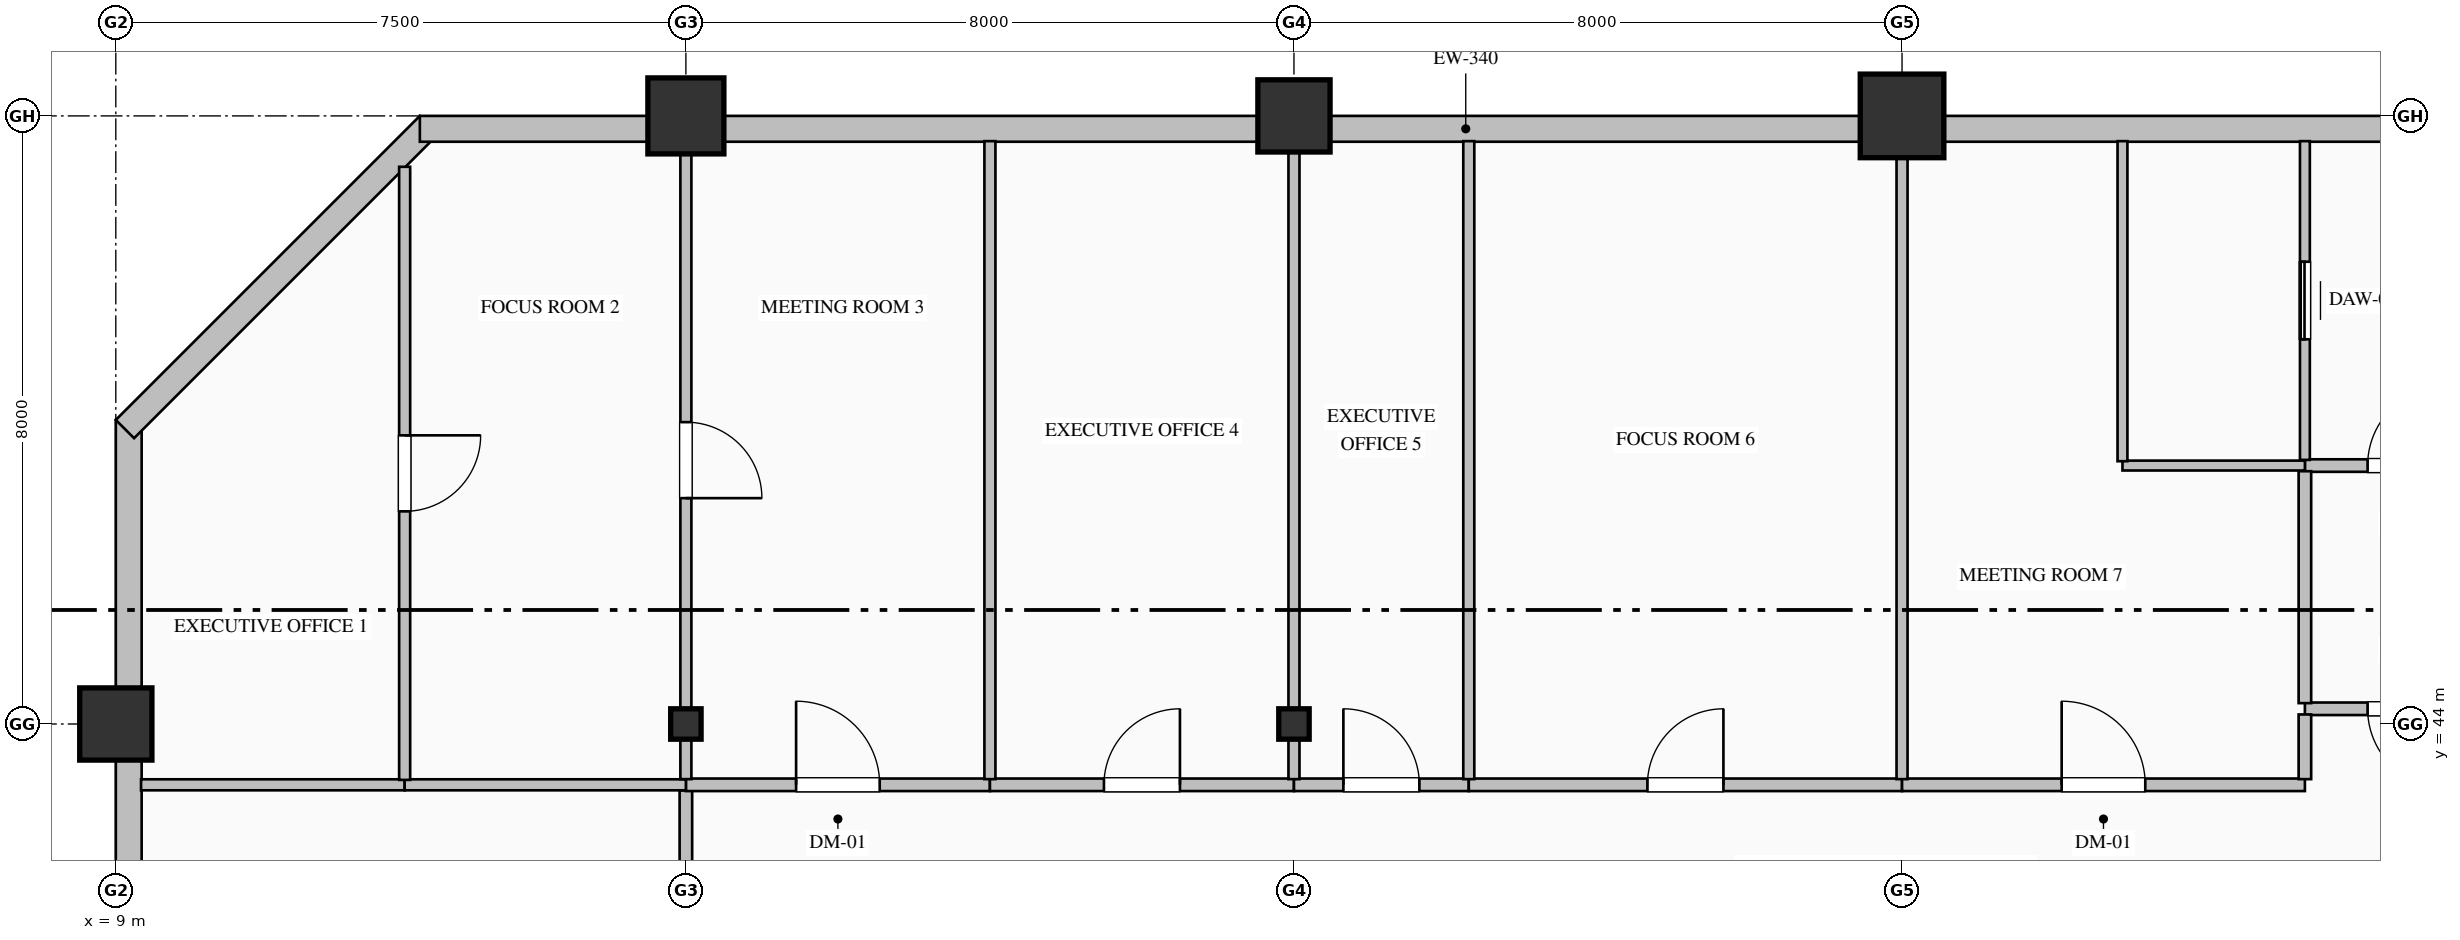
"""IFC4 building model, lengths in metres.
Left out: names, types, materials, properties, quantities, classifications, styles, units other than length and angle.
Written with IfcOpenShell. Run it as: python <this file> out.ifc"""

import sys

from ifc_helpers import new_model, si_unit, direction, frame, frame_2d, origin, origin_2d, place, context, subcontext, project, spatial, rectangle, hollow_rectangle, hollow_circle, i_section, extrude, element, fill, save


model = new_model("IFC4")
c1 = context("Model", 3, precision=1e-05, world=origin(), true_north=direction((0.0, 1.0)))
c2 = subcontext(c1, "Body", "Model", "MODEL_VIEW")
j1 = project(units=[si_unit("LENGTHUNIT", "METRE"), si_unit("PLANEANGLEUNIT", "RADIAN")], contexts=[c1])
p1 = place(None, origin())
s1 = spatial("IfcSite", under=j1, at=p1, CompositionType="ELEMENT")
p2 = place(p1, origin())
s2 = spatial("IfcBuilding", under=s1, at=p2, CompositionType="ELEMENT")
p3 = place(p2, frame((0.0, 0.0, 127.0)))
s3 = spatial("IfcBuildingStorey", under=s2, at=p3, CompositionType="ELEMENT", Elevation=127.0)
p4 = place(p3, frame((9.0, 44.0, 0.0), z_axis=(0.0, 0.0, 1.0), x_axis=(1.0, 0.0, 0.0)))
e1 = element("IfcColumn", 1, at=p4, inside=s3, PredefinedType="COLUMN", context=c2, shape_type="SweptSolid", body=[
    extrude(hollow_rectangle(XDim=0.95, YDim=0.95, WallThickness=0.036, at=origin_2d()), origin(), (0.0, 0.0, 1.0), 4.0),
])
p5 = place(p3, frame((16.5, 44.0, 0.0), z_axis=(0.0, 0.0, 1.0), x_axis=(1.0, 0.0, 0.0)))
e2 = element("IfcColumn", 2, at=p5, inside=s3, PredefinedType="COLUMN", context=c2, shape_type="SweptSolid", body=[
    extrude(i_section(OverallWidth=0.4, OverallDepth=0.4, WebThickness=0.013, FlangeThickness=0.021, FilletRadius=0.022, at=origin_2d()), origin(), (0.0, 0.0, 1.0), 4.0),
])
p6 = place(p3, frame((16.5, 52.0, 0.0), z_axis=(0.0, 0.0, 1.0), x_axis=(1.0, 0.0, 0.0)))
e3 = element("IfcColumn", 3, at=p6, inside=s3, PredefinedType="COLUMN", context=c2, shape_type="SweptSolid", body=[
    extrude(hollow_circle(Radius=0.5, WallThickness=0.036, at=origin_2d()), origin(), (0.0, 0.0, 1.0), 4.0),
])
p7 = place(p3, frame((24.5, 44.0, 0.0), z_axis=(0.0, 0.0, 1.0), x_axis=(1.0, 0.0, 0.0)))
e4 = element("IfcColumn", 4, at=p7, inside=s3, PredefinedType="COLUMN", context=c2, shape_type="SweptSolid", body=[
    extrude(i_section(OverallWidth=0.4, OverallDepth=0.4, WebThickness=0.013, FlangeThickness=0.021, FilletRadius=0.022, at=origin_2d()), origin(), (0.0, 0.0, 1.0), 4.0),
])
p8 = place(p3, frame((24.5, 52.0, 0.0), z_axis=(0.0, 0.0, 1.0), x_axis=(1.0, 0.0, 0.0)))
e5 = element("IfcColumn", 5, at=p8, inside=s3, PredefinedType="COLUMN", context=c2, shape_type="SweptSolid", body=[
    extrude(hollow_rectangle(XDim=0.95, YDim=0.95, WallThickness=0.036, at=origin_2d()), origin(), (0.0, 0.0, 1.0), 4.0),
])
p9 = place(p3, frame((32.5, 52.0, 0.0), z_axis=(0.0, 0.0, 1.0), x_axis=(1.0, 0.0, 0.0)))
e6 = element("IfcColumn", 6, at=p9, inside=s3, PredefinedType="COLUMN", context=c2, shape_type="SweptSolid", body=[
    extrude(hollow_rectangle(XDim=1.1, YDim=1.1, WallThickness=0.04, at=origin_2d()), origin(), (0.0, 0.0, 1.0), 4.0),
])
p10 = place(p3, frame((9.17, 32.0, 0.0), z_axis=(0.0, 0.0, 1.0), x_axis=(0.0, 1.0, 0.0)))
e7 = element("IfcWall", 7, at=p10, inside=s3, PredefinedType="SOLIDWALL", context=c2, shape_type="SweptSolid", body=[
    extrude(rectangle(XDim=16.0, YDim=0.34, at=frame_2d((8.0, 0.0))), origin(), (0.0, 0.0, 1.0), 3.265),
])
p11 = place(p10, frame((6.375, 0.0, 0.85)))
e8 = element("IfcOpeningElement", 8, at=p11, cuts=e7, PredefinedType="OPENING", context=c2, shape_type="SweptSolid", body=[
    extrude(rectangle(XDim=1.65, YDim=1.95, at=frame_2d((0.825, 0.975))), frame((0.0, 0.18, 0.0), z_axis=(0.0, -1.0, 0.0), x_axis=(1.0, 0.0, 0.0)), (0.0, 0.0, 1.0), 0.36),
])
p12 = place(p3, frame((9.12, 47.88, 0.0), z_axis=(0.0, 0.0, 1.0), x_axis=(0.707106781187, 0.707106781187, 0.0)))
e9 = element("IfcWall", 9, at=p12, inside=s3, PredefinedType="SOLIDWALL", context=c2, shape_type="SweptSolid", body=[
    extrude(rectangle(XDim=5.657, YDim=0.34, at=frame_2d((2.828, 0.0))), origin(), (0.0, 0.0, 1.0), 3.765),
])
p13 = place(p3, frame((13.0, 51.83, 0.0), z_axis=(0.0, 0.0, 1.0), x_axis=(1.0, 0.0, 0.0)))
e10 = element("IfcWall", 10, at=p13, inside=s3, PredefinedType="SOLIDWALL", context=c2, shape_type="SweptSolid", body=[
    extrude(rectangle(XDim=27.52, YDim=0.34, at=frame_2d((13.76, 0.0))), origin(), (0.0, 0.0, 1.0), 3.265),
])
p14 = place(p3, frame((37.8, 47.4, 0.0), z_axis=(0.0, 0.0, 1.0), x_axis=(1.0, 0.0, 0.0)))
e11 = element("IfcWall", 11, at=p14, inside=s3, PredefinedType="PARTITIONING", context=c2, shape_type="SweptSolid", body=[
    extrude(rectangle(XDim=2.7, YDim=0.165, at=frame_2d((1.35, 0.0))), origin(), (0.0, 0.0, 1.0), 3.765),
])
p15 = place(p14, frame((0.825, 0.0, 0.0)))
e12 = element("IfcOpeningElement", 12, at=p15, cuts=e11, PredefinedType="OPENING", context=c2, shape_type="SweptSolid", body=[
    extrude(rectangle(XDim=1.05, YDim=2.15, at=frame_2d((0.525, 1.075))), frame((0.0, 0.093, 0.0), z_axis=(0.0, -1.0, 0.0), x_axis=(1.0, 0.0, 0.0)), (0.0, 0.0, 1.0), 0.185),
])
p16 = place(p3, frame((40.5, 44.2, 0.0), z_axis=(0.0, 0.0, 1.0), x_axis=(-1.0, 0.0, 0.0)))
e13 = element("IfcWall", 13, at=p16, inside=s3, PredefinedType="PARTITIONING", context=c2, shape_type="SweptSolid", body=[
    extrude(rectangle(XDim=2.7, YDim=0.165, at=frame_2d((1.35, 0.0))), origin(), (0.0, 0.0, 1.0), 3.765),
])
p17 = place(p16, frame((0.825, 0.0, 0.0)))
e14 = element("IfcOpeningElement", 14, at=p17, cuts=e13, PredefinedType="OPENING", context=c2, shape_type="SweptSolid", body=[
    extrude(rectangle(XDim=1.05, YDim=2.15, at=frame_2d((0.525, 1.075))), frame((0.0, 0.093, 0.0), z_axis=(0.0, -1.0, 0.0), x_axis=(1.0, 0.0, 0.0)), (0.0, 0.0, 1.0), 0.185),
])
p18 = place(p3, frame((37.8, 44.274, 0.0), z_axis=(0.0, 0.0, 1.0), x_axis=(0.0, 1.0, 0.0)))
e15 = element("IfcWall", 15, at=p18, inside=s3, PredefinedType="PARTITIONING", context=c2, shape_type="SweptSolid", body=[
    extrude(rectangle(XDim=3.051, YDim=0.165, at=frame_2d((1.525, 0.0))), origin(), (0.0, 0.0, 1.0), 3.765),
])
p19 = place(p3, frame((37.8, 47.475, 0.0), z_axis=(0.0, 0.0, 1.0), x_axis=(0.0, 1.0, 0.0)))
e16 = element("IfcWall", 16, at=p19, inside=s3, PredefinedType="PARTITIONING", context=c2, shape_type="SweptSolid", body=[
    extrude(rectangle(XDim=4.193, YDim=0.13, at=frame_2d((2.097, 0.0))), origin(), (0.0, 0.0, 1.0), 3.765),
])
p20 = place(p19, frame((1.587, 0.0, 0.0)))
e17 = element("IfcOpeningElement", 17, at=p20, cuts=e16, PredefinedType="OPENING", context=c2, shape_type="SweptSolid", body=[
    extrude(rectangle(XDim=1.02, YDim=2.15, at=frame_2d((0.51, 1.075))), frame((0.0, 0.075, 0.0), z_axis=(0.0, -1.0, 0.0), x_axis=(1.0, 0.0, 0.0)), (0.0, 0.0, 1.0), 0.15),
])
p21 = place(p3, frame((37.8, 47.4, 0.0), z_axis=(0.0, 0.0, 1.0), x_axis=(-1.0, 0.0, 0.0)))
e18 = element("IfcWall", 18, at=p21, inside=s3, PredefinedType="PARTITIONING", context=c2, shape_type="SweptSolid", body=[
    extrude(rectangle(XDim=2.4, YDim=0.13, at=frame_2d((1.2, 0.0))), origin(), (0.0, 0.0, 1.0), 3.765),
])
p22 = place(p3, frame((35.4, 47.457, 0.0), z_axis=(0.0, 0.0, 1.0), x_axis=(0.0, 1.0, 0.0)))
e19 = element("IfcWall", 19, at=p22, inside=s3, PredefinedType="PARTITIONING", context=c2, shape_type="SweptSolid", body=[
    extrude(rectangle(XDim=4.211, YDim=0.13, at=frame_2d((2.105, 0.0))), origin(), (0.0, 0.0, 1.0), 3.765),
])
p23 = place(p3, frame((16.5, 41.0, 0.0), z_axis=(0.0, 0.0, 1.0), x_axis=(0.0, 1.0, 0.0)))
e20 = element("IfcWall", 20, at=p23, inside=s3, PredefinedType="PARTITIONING", context=c2, shape_type="SweptSolid", body=[
    extrude(rectangle(XDim=2.125, YDim=0.165, at=frame_2d((1.063, 0.0))), origin(), (0.0, 0.0, 1.0), 3.157),
])
p24 = place(p3, frame((16.5, 43.2, 0.0), z_axis=(0.0, 0.0, 1.0), x_axis=(1.0, 0.0, 0.0)))
e21 = element("IfcWall", 21, at=p24, inside=s3, PredefinedType="PARTITIONING", context=c2, shape_type="SweptSolid", body=[
    extrude(rectangle(XDim=4.0, YDim=0.165, at=frame_2d((2.0, 0.0))), origin(), (0.0, 0.0, 1.0), 3.765),
])
p25 = place(p24, frame((1.45, 0.0, 0.0)))
e22 = element("IfcOpeningElement", 22, at=p25, cuts=e21, PredefinedType="OPENING", context=c2, shape_type="SweptSolid", body=[
    extrude(rectangle(XDim=1.1, YDim=2.2, at=frame_2d((0.55, 1.1))), frame((0.0, 0.093, 0.0), z_axis=(0.0, -1.0, 0.0), x_axis=(1.0, 0.0, 0.0)), (0.0, 0.0, 1.0), 0.185),
])
p26 = place(p3, frame((20.5, 43.2, 0.0), z_axis=(0.0, 0.0, 1.0), x_axis=(1.0, 0.0, 0.0)))
e23 = element("IfcWall", 23, at=p26, inside=s3, PredefinedType="PARTITIONING", context=c2, shape_type="SweptSolid", body=[
    extrude(rectangle(XDim=4.0, YDim=0.165, at=frame_2d((2.0, 0.0))), origin(), (0.0, 0.0, 1.0), 3.765),
])
p27 = place(p26, frame((1.5, 0.0, 0.0)))
e24 = element("IfcOpeningElement", 24, at=p27, cuts=e23, PredefinedType="OPENING", context=c2, shape_type="SweptSolid", body=[
    extrude(rectangle(XDim=1.0, YDim=2.15, at=frame_2d((0.5, 1.075))), frame((0.0, 0.093, 0.0), z_axis=(0.0, -1.0, 0.0), x_axis=(1.0, 0.0, 0.0)), (0.0, 0.0, 1.0), 0.185),
])
p28 = place(p3, frame((24.5, 43.2, 0.0), z_axis=(0.0, 0.0, 1.0), x_axis=(1.0, 0.0, 0.0)))
e25 = element("IfcWall", 25, at=p28, inside=s3, PredefinedType="PARTITIONING", context=c2, shape_type="SweptSolid", body=[
    extrude(rectangle(XDim=2.3, YDim=0.165, at=frame_2d((1.15, 0.0))), origin(), (0.0, 0.0, 1.0), 3.765),
])
p29 = place(p28, frame((0.65, 0.0, 0.0)))
e26 = element("IfcOpeningElement", 26, at=p29, cuts=e25, PredefinedType="OPENING", context=c2, shape_type="SweptSolid", body=[
    extrude(rectangle(XDim=1.0, YDim=2.15, at=frame_2d((0.5, 1.075))), frame((0.0, 0.093, 0.0), z_axis=(0.0, -1.0, 0.0), x_axis=(1.0, 0.0, 0.0)), (0.0, 0.0, 1.0), 0.185),
])
p30 = place(p3, frame((26.8, 43.2, 0.0), z_axis=(0.0, 0.0, 1.0), x_axis=(1.0, 0.0, 0.0)))
e27 = element("IfcWall", 27, at=p30, inside=s3, PredefinedType="PARTITIONING", context=c2, shape_type="SweptSolid", body=[
    extrude(rectangle(XDim=5.7, YDim=0.165, at=frame_2d((2.85, 0.0))), origin(), (0.0, 0.0, 1.0), 3.765),
])
p31 = place(p30, frame((2.35, 0.0, 0.0)))
e28 = element("IfcOpeningElement", 28, at=p31, cuts=e27, PredefinedType="OPENING", context=c2, shape_type="SweptSolid", body=[
    extrude(rectangle(XDim=1.0, YDim=2.15, at=frame_2d((0.5, 1.075))), frame((0.0, 0.093, 0.0), z_axis=(0.0, -1.0, 0.0), x_axis=(1.0, 0.0, 0.0)), (0.0, 0.0, 1.0), 0.185),
])
p32 = place(p3, frame((32.5, 43.2, 0.0), z_axis=(0.0, 0.0, 1.0), x_axis=(1.0, 0.0, 0.0)))
e29 = element("IfcWall", 29, at=p32, inside=s3, PredefinedType="PARTITIONING", context=c2, shape_type="SweptSolid", body=[
    extrude(rectangle(XDim=5.3, YDim=0.165, at=frame_2d((2.65, 0.0))), origin(), (0.0, 0.0, 1.0), 3.765),
])
p33 = place(p32, frame((2.1, 0.0, 0.0)))
e30 = element("IfcOpeningElement", 30, at=p33, cuts=e29, PredefinedType="OPENING", context=c2, shape_type="SweptSolid", body=[
    extrude(rectangle(XDim=1.1, YDim=2.2, at=frame_2d((0.55, 1.1))), frame((0.0, 0.093, 0.0), z_axis=(0.0, -1.0, 0.0), x_axis=(1.0, 0.0, 0.0)), (0.0, 0.0, 1.0), 0.185),
])
p34 = place(p3, frame((37.8, 43.274, 0.0), z_axis=(0.0, 0.0, 1.0), x_axis=(0.0, 1.0, 0.0)))
e31 = element("IfcWall", 31, at=p34, inside=s3, PredefinedType="PARTITIONING", context=c2, shape_type="SweptSolid", body=[
    extrude(rectangle(XDim=0.851, YDim=0.165, at=frame_2d((0.426, 0.0))), origin(), (0.0, 0.0, 1.0), 3.765),
])
p35 = place(p3, frame((9.332, 43.2, 0.0), z_axis=(0.0, 0.0, 1.0), x_axis=(1.0, 0.0, 0.0)))
e32 = element("IfcWall", 32, at=p35, inside=s3, PredefinedType="PARTITIONING", context=c2, shape_type="SweptSolid", body=[
    extrude(rectangle(XDim=3.468, YDim=0.145, at=frame_2d((1.734, 0.0))), origin(), (0.0, 0.0, 1.0), 3.765),
])
p36 = place(p3, frame((12.8, 43.2, 0.0), z_axis=(0.0, 0.0, 1.0), x_axis=(1.0, 0.0, 0.0)))
e33 = element("IfcWall", 33, at=p36, inside=s3, PredefinedType="PARTITIONING", context=c2, shape_type="SweptSolid", body=[
    extrude(rectangle(XDim=3.7, YDim=0.145, at=frame_2d((1.85, 0.0))), origin(), (0.0, 0.0, 1.0), 3.765),
])
p37 = place(p3, frame((12.8, 51.331, 0.0), z_axis=(0.0, 0.0, 1.0), x_axis=(0.0, -1.0, 0.0)))
e34 = element("IfcWall", 34, at=p37, inside=s3, PredefinedType="PARTITIONING", context=c2, shape_type="SweptSolid", body=[
    extrude(rectangle(XDim=8.066, YDim=0.145, at=frame_2d((4.033, 0.0))), origin(), (0.0, 0.0, 1.0), 3.765),
])
p38 = place(p37, frame((3.533, 0.0, 0.0)))
e35 = element("IfcOpeningElement", 35, at=p38, cuts=e34, PredefinedType="OPENING", context=c2, shape_type="SweptSolid", body=[
    extrude(rectangle(XDim=1.0, YDim=2.15, at=frame_2d((0.5, 1.075))), frame((0.0, 0.083, 0.0), z_axis=(0.0, -1.0, 0.0), x_axis=(1.0, 0.0, 0.0)), (0.0, 0.0, 1.0), 0.165),
])
p39 = place(p3, frame((16.5, 51.668, 0.0), z_axis=(0.0, 0.0, 1.0), x_axis=(0.0, -1.0, 0.0)))
e36 = element("IfcWall", 36, at=p39, inside=s3, PredefinedType="PARTITIONING", context=c2, shape_type="SweptSolid", body=[
    extrude(rectangle(XDim=8.394, YDim=0.145, at=frame_2d((4.197, 0.0))), origin(), (0.0, 0.0, 1.0), 3.157),
])
p40 = place(p39, frame((3.697, 0.0, 0.0)))
e37 = element("IfcOpeningElement", 37, at=p40, cuts=e36, PredefinedType="OPENING", context=c2, shape_type="SweptSolid", body=[
    extrude(rectangle(XDim=1.0, YDim=2.15, at=frame_2d((0.5, 1.075))), frame((0.0, 0.083, 0.0), z_axis=(0.0, -1.0, 0.0), x_axis=(1.0, 0.0, 0.0)), (0.0, 0.0, 1.0), 0.165),
])
p41 = place(p3, frame((20.5, 51.668, 0.0), z_axis=(0.0, 0.0, 1.0), x_axis=(0.0, -1.0, 0.0)))
e38 = element("IfcWall", 38, at=p41, inside=s3, PredefinedType="PARTITIONING", context=c2, shape_type="SweptSolid", body=[
    extrude(rectangle(XDim=8.394, YDim=0.145, at=frame_2d((4.197, 0.0))), origin(), (0.0, 0.0, 1.0), 3.765),
])
p42 = place(p3, frame((24.5, 51.668, 0.0), z_axis=(0.0, 0.0, 1.0), x_axis=(0.0, -1.0, 0.0)))
e39 = element("IfcWall", 39, at=p42, inside=s3, PredefinedType="PARTITIONING", context=c2, shape_type="SweptSolid", body=[
    extrude(rectangle(XDim=8.394, YDim=0.145, at=frame_2d((4.197, 0.0))), origin(), (0.0, 0.0, 1.0), 3.157),
])
for number, where, z_axis, x_axis in (
    (40, (26.8, 51.668, 0.0), (0.0, 0.0, 1.0), (0.0, -1.0, 0.0)),
    (41, (32.5, 51.668, 0.0), (0.0, 0.0, 1.0), (0.0, -1.0, 0.0)),
):
    element("IfcWall", number, at=place(p3, frame(where, z_axis=z_axis, x_axis=x_axis)), inside=s3, PredefinedType="PARTITIONING", context=c2, shape_type="SweptSolid", body=[
        extrude(rectangle(XDim=8.394, YDim=0.145, at=frame_2d((4.197, 0.0))), origin(), (0.0, 0.0, 1.0), 3.765),
    ])
p43 = place(p15, origin())
e42 = element("IfcDoor", 42, at=p43, inside=s3, OperationType="SINGLE_SWING_RIGHT", PredefinedType="DOOR", context=c2, shape_type="SweptSolid", body=[
    extrude(rectangle(XDim=1.05, YDim=2.15, at=frame_2d((0.525, 1.075))), frame((0.0, 0.025, 0.0), z_axis=(0.0, -1.0, 0.0), x_axis=(1.0, 0.0, 0.0)), (0.0, 0.0, 1.0), 0.05),
])
fill(e12, e42)
p44 = place(p17, origin())
e43 = element("IfcDoor", 43, at=p44, inside=s3, OperationType="SINGLE_SWING_LEFT", PredefinedType="DOOR", context=c2, shape_type="SweptSolid", body=[
    extrude(rectangle(XDim=1.05, YDim=2.15, at=frame_2d((0.525, 1.075))), frame((0.0, 0.025, 0.0), z_axis=(0.0, -1.0, 0.0), x_axis=(1.0, 0.0, 0.0)), (0.0, 0.0, 1.0), 0.05),
])
fill(e14, e43)
p45 = place(p20, origin())
e44 = element("IfcDoor", 44, at=p45, inside=s3, OperationType="SLIDING_TO_LEFT", PredefinedType="DOOR", context=c2, shape_type="SweptSolid", body=[
    extrude(rectangle(XDim=1.02, YDim=2.15, at=frame_2d((0.51, 1.075))), frame((0.0, 0.025, 0.0), z_axis=(0.0, -1.0, 0.0), x_axis=(1.0, 0.0, 0.0)), (0.0, 0.0, 1.0), 0.05),
])
fill(e17, e44)
p46 = place(p38, origin())
e45 = element("IfcDoor", 45, at=p46, inside=s3, OperationType="SINGLE_SWING_LEFT", PredefinedType="DOOR", context=c2, shape_type="SweptSolid", body=[
    extrude(rectangle(XDim=1.0, YDim=2.15, at=frame_2d((0.5, 1.075))), frame((0.0, 0.025, 0.0), z_axis=(0.0, -1.0, 0.0), x_axis=(1.0, 0.0, 0.0)), (0.0, 0.0, 1.0), 0.05),
])
fill(e35, e45)
p47 = place(p40, origin())
e46 = element("IfcDoor", 46, at=p47, inside=s3, OperationType="SINGLE_SWING_RIGHT", PredefinedType="DOOR", context=c2, shape_type="SweptSolid", body=[
    extrude(rectangle(XDim=1.0, YDim=2.15, at=frame_2d((0.5, 1.075))), frame((0.0, 0.025, 0.0), z_axis=(0.0, -1.0, 0.0), x_axis=(1.0, 0.0, 0.0)), (0.0, 0.0, 1.0), 0.05),
])
fill(e37, e46)
p48 = place(p25, origin())
e47 = element("IfcDoor", 47, at=p48, inside=s3, OperationType="SINGLE_SWING_LEFT", PredefinedType="DOOR", context=c2, shape_type="SweptSolid", body=[
    extrude(rectangle(XDim=1.1, YDim=2.2, at=frame_2d((0.55, 1.1))), frame((0.0, 0.025, 0.0), z_axis=(0.0, -1.0, 0.0), x_axis=(1.0, 0.0, 0.0)), (0.0, 0.0, 1.0), 0.05),
])
fill(e22, e47)
p49 = place(p27, origin())
e48 = element("IfcDoor", 48, at=p49, inside=s3, OperationType="SINGLE_SWING_RIGHT", PredefinedType="DOOR", context=c2, shape_type="SweptSolid", body=[
    extrude(rectangle(XDim=1.0, YDim=2.15, at=frame_2d((0.5, 1.075))), frame((0.0, 0.025, 0.0), z_axis=(0.0, -1.0, 0.0), x_axis=(1.0, 0.0, 0.0)), (0.0, 0.0, 1.0), 0.05),
])
fill(e24, e48)
p50 = place(p29, origin())
e49 = element("IfcDoor", 49, at=p50, inside=s3, OperationType="SINGLE_SWING_LEFT", PredefinedType="DOOR", context=c2, shape_type="SweptSolid", body=[
    extrude(rectangle(XDim=1.0, YDim=2.15, at=frame_2d((0.5, 1.075))), frame((0.0, 0.025, 0.0), z_axis=(0.0, -1.0, 0.0), x_axis=(1.0, 0.0, 0.0)), (0.0, 0.0, 1.0), 0.05),
])
fill(e26, e49)
p51 = place(p31, origin())
e50 = element("IfcDoor", 50, at=p51, inside=s3, OperationType="SINGLE_SWING_RIGHT", PredefinedType="DOOR", context=c2, shape_type="SweptSolid", body=[
    extrude(rectangle(XDim=1.0, YDim=2.15, at=frame_2d((0.5, 1.075))), frame((0.0, 0.025, 0.0), z_axis=(0.0, -1.0, 0.0), x_axis=(1.0, 0.0, 0.0)), (0.0, 0.0, 1.0), 0.05),
])
fill(e28, e50)
p52 = place(p33, origin())
e51 = element("IfcDoor", 51, at=p52, inside=s3, OperationType="SINGLE_SWING_LEFT", PredefinedType="DOOR", context=c2, shape_type="SweptSolid", body=[
    extrude(rectangle(XDim=1.1, YDim=2.2, at=frame_2d((0.55, 1.1))), frame((0.0, 0.025, 0.0), z_axis=(0.0, -1.0, 0.0), x_axis=(1.0, 0.0, 0.0)), (0.0, 0.0, 1.0), 0.05),
])
fill(e30, e51)
save(model, sys.argv[1])
